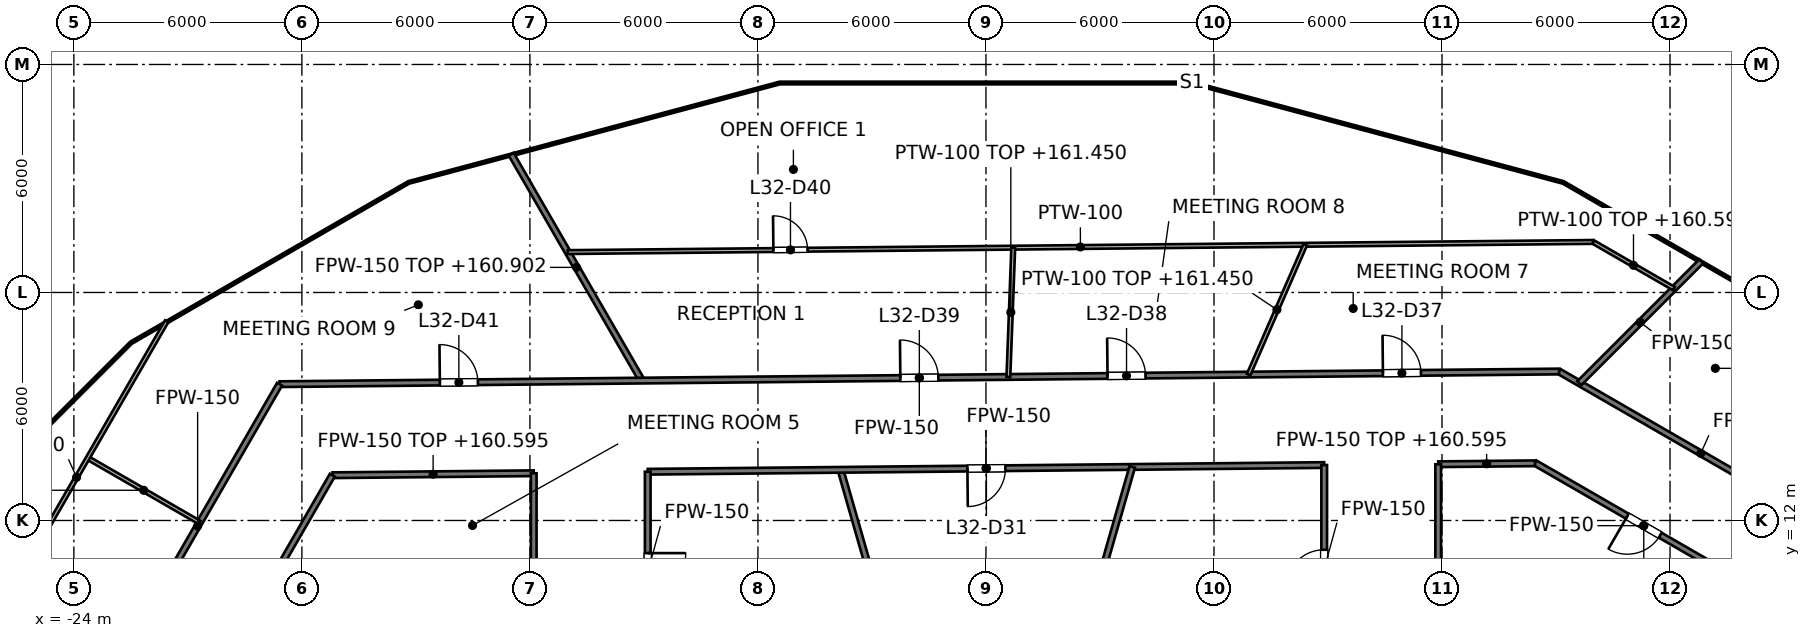
"""IFC4 building model, lengths in metres.
Left out: names, types, materials, properties, quantities, classifications, styles, units other than length and angle.
Written with IfcOpenShell. Run it as: python <this file> out.ifc"""

import sys

from ifc_helpers import new_model, si_unit, direction, frame, frame_2d, origin, place, context, subcontext, project, spatial, rectangle, extrude, element, fill, save


model = new_model("IFC4")
c1 = context("Model", 3, precision=1e-05, world=origin(), true_north=direction((0.0, 1.0)))
c2 = subcontext(c1, "Body", "Model", "MODEL_VIEW")
j1 = project(units=[si_unit("LENGTHUNIT", "METRE"), si_unit("PLANEANGLEUNIT", "RADIAN")], contexts=[c1])
p1 = place(None, origin())
s1 = spatial("IfcSite", under=j1, at=p1, CompositionType="ELEMENT")
p2 = place(p1, origin())
s2 = spatial("IfcBuilding", under=s1, at=p2, CompositionType="ELEMENT")
p3 = place(p2, frame((0.0, 0.0, 157.6)))
s3 = spatial("IfcBuildingStorey", under=s2, at=p3, CompositionType="ELEMENT", Elevation=157.6)
p4 = place(p3, frame((-3.827, 13.333, 0.0), z_axis=(0.0, 0.0, 1.0), x_axis=(0.275935525478, -0.961176147113, 0.0)))
e1 = element("IfcWall", 1, at=p4, inside=s3, PredefinedType="PARTITIONING", context=c2, shape_type="SweptSolid", body=[
    extrude(rectangle(XDim=5.548, YDim=0.15, at=frame_2d((2.774, 0.0))), origin(), (0.0, 0.0, 1.0), 3.85),
])
p5 = place(p3, frame((-12.493, 21.639, 0.0), z_axis=(0.0, 0.0, 1.0), x_axis=(0.499964153563, -0.866046098746, 0.0)))
e2 = element("IfcWall", 2, at=p5, inside=s3, PredefinedType="PARTITIONING", context=c2, shape_type="SweptSolid", body=[
    extrude(rectangle(XDim=6.878, YDim=0.15, at=frame_2d((3.439, 0.0))), origin(), (0.0, 0.0, 1.0), 3.302),
])
p6 = place(p3, frame((14.448, 13.515, 0.0), z_axis=(0.0, 0.0, 1.0), x_axis=(0.865975016585, -0.500087263036, 0.0)))
e3 = element("IfcWall", 3, at=p6, inside=s3, PredefinedType="PARTITIONING", context=c2, shape_type="SweptSolid", body=[
    extrude(rectangle(XDim=6.604, YDim=0.15, at=frame_2d((3.302, 0.0))), origin(), (0.0, 0.0, 1.0), 2.927),
])
p7 = place(p6, frame((2.804, 0.0, 0.0)))
e4 = element("IfcOpeningElement", 4, at=p7, cuts=e3, PredefinedType="OPENING", context=c2, shape_type="SweptSolid", body=[
    extrude(rectangle(XDim=1.0, YDim=2.1, at=frame_2d((0.5, 1.05))), frame((0.0, 0.075, 0.0), z_axis=(0.0, -1.0, 0.0), x_axis=(1.0, 0.0, 0.0)), (0.0, 0.0, 1.0), 0.15),
])
p8 = place(p3, frame((15.08, 15.921, 0.0), z_axis=(0.0, 0.0, 1.0), x_axis=(0.865982112089, -0.50007497592, 0.0)))
e5 = element("IfcWall", 5, at=p8, inside=s3, PredefinedType="PARTITIONING", context=c2, shape_type="SweptSolid", body=[
    extrude(rectangle(XDim=8.613, YDim=0.15, at=frame_2d((4.306, 0.0))), origin(), (0.0, 0.0, 1.0), 2.927),
])
p9 = place(p3, frame((-17.194, 13.191, 0.0), z_axis=(0.0, 0.0, 1.0), x_axis=(0.999950853109, 0.009914200296, 0.0)))
e6 = element("IfcWall", 6, at=p9, inside=s3, PredefinedType="PARTITIONING", context=c2, shape_type="SweptSolid", body=[
    extrude(rectangle(XDim=5.294, YDim=0.15, at=frame_2d((2.647, 0.0))), origin(), (0.0, 0.0, 1.0), 2.995),
])
p10 = place(p3, frame((-8.9, 13.282, 0.0), z_axis=(0.0, 0.0, 1.0), x_axis=(0.999950834077, 0.009916119672, 0.0)))
e7 = element("IfcWall", 7, at=p10, inside=s3, PredefinedType="PARTITIONING", context=c2, shape_type="SweptSolid", body=[
    extrude(rectangle(XDim=17.801, YDim=0.15, at=frame_2d((8.9, 0.0))), origin(), (0.0, 0.0, 1.0), 2.927),
])
p11 = place(p10, frame((8.412, 0.0, 0.0)))
e8 = element("IfcOpeningElement", 8, at=p11, cuts=e7, PredefinedType="OPENING", context=c2, shape_type="SweptSolid", body=[
    extrude(rectangle(XDim=1.0, YDim=2.1, at=frame_2d((0.5, 1.05))), frame((0.0, 0.075, 0.0), z_axis=(0.0, -1.0, 0.0), x_axis=(1.0, 0.0, 0.0)), (0.0, 0.0, 1.0), 0.15),
])
p12 = place(p3, frame((11.9, 13.48, 0.0), z_axis=(0.0, 0.0, 1.0), x_axis=(0.999950357576, 0.009964054536, 0.0)))
e9 = element("IfcWall", 9, at=p12, inside=s3, PredefinedType="PARTITIONING", context=c2, shape_type="SweptSolid", body=[
    extrude(rectangle(XDim=2.548, YDim=0.15, at=frame_2d((1.274, 0.0))), origin(), (0.0, 0.0, 1.0), 2.995),
])
p13 = place(p3, frame((-18.587, 15.587, 0.0), z_axis=(0.0, 0.0, 1.0), x_axis=(0.99995087003, 0.009912493396, 0.0)))
e10 = element("IfcWall", 10, at=p13, inside=s3, PredefinedType="PARTITIONING", context=c2, shape_type="SweptSolid", body=[
    extrude(rectangle(XDim=33.669, YDim=0.15, at=frame_2d((16.834, 0.0))), origin(), (0.0, 0.0, 1.0), 2.927),
])
p14 = place(p13, frame((29.033, 0.0, 0.0)))
e11 = element("IfcOpeningElement", 11, at=p14, cuts=e10, PredefinedType="OPENING", context=c2, shape_type="SweptSolid", body=[
    extrude(rectangle(XDim=1.0, YDim=2.1, at=frame_2d((0.5, 1.05))), frame((0.0, 0.075, 0.0), z_axis=(0.0, -1.0, 0.0), x_axis=(1.0, 0.0, 0.0)), (0.0, 0.0, 1.0), 0.15),
])
p15 = place(p13, frame((21.787, 0.0, 0.0)))
e12 = element("IfcOpeningElement", 12, at=p15, cuts=e10, PredefinedType="OPENING", context=c2, shape_type="SweptSolid", body=[
    extrude(rectangle(XDim=1.0, YDim=2.1, at=frame_2d((0.5, 1.05))), frame((0.0, 0.075, 0.0), z_axis=(0.0, -1.0, 0.0), x_axis=(1.0, 0.0, 0.0)), (0.0, 0.0, 1.0), 0.15),
])
p16 = place(p13, frame((16.335, 0.0, 0.0)))
e13 = element("IfcOpeningElement", 13, at=p16, cuts=e10, PredefinedType="OPENING", context=c2, shape_type="SweptSolid", body=[
    extrude(rectangle(XDim=1.0, YDim=2.1, at=frame_2d((0.5, 1.05))), frame((0.0, 0.075, 0.0), z_axis=(0.0, -1.0, 0.0), x_axis=(1.0, 0.0, 0.0)), (0.0, 0.0, 1.0), 0.15),
])
p17 = place(p13, frame((4.217, 0.0, 0.0)))
e14 = element("IfcOpeningElement", 14, at=p17, cuts=e10, PredefinedType="OPENING", context=c2, shape_type="SweptSolid", body=[
    extrude(rectangle(XDim=1.0, YDim=2.1, at=frame_2d((0.5, 1.05))), frame((0.0, 0.075, 0.0), z_axis=(0.0, -1.0, 0.0), x_axis=(1.0, 0.0, 0.0)), (0.0, 0.0, 1.0), 0.15),
])
p18 = place(p3, frame((15.613, 15.613, 0.0), z_axis=(0.0, 0.0, 1.0), x_axis=(0.707106781187, 0.707106781187, 0.0)))
e15 = element("IfcWall", 15, at=p18, inside=s3, PredefinedType="PARTITIONING", context=c2, shape_type="SweptSolid", body=[
    extrude(rectangle(XDim=4.538, YDim=0.15, at=frame_2d((2.269, 0.0))), origin(), (0.0, 0.0, 1.0), 2.995),
])
p19 = place(p3, frame((-20.5, 7.474, 0.0), z_axis=(0.0, 0.0, 1.0), x_axis=(0.500012665616, 0.866018091164, 0.0)))
e16 = element("IfcWall", 16, at=p19, inside=s3, PredefinedType="PARTITIONING", context=c2, shape_type="SweptSolid", body=[
    extrude(rectangle(XDim=6.602, YDim=0.15, at=frame_2d((3.301, 0.0))), origin(), (0.0, 0.0, 1.0), 2.927),
])
p20 = place(p19, frame((2.803, 0.0, 0.0)))
e17 = element("IfcOpeningElement", 17, at=p20, cuts=e16, PredefinedType="OPENING", context=c2, shape_type="SweptSolid", body=[
    extrude(rectangle(XDim=1.0, YDim=2.1, at=frame_2d((0.5, 1.05))), frame((0.0, 0.075, 0.0), z_axis=(0.0, -1.0, 0.0), x_axis=(1.0, 0.0, 0.0)), (0.0, 0.0, 1.0), 0.15),
])
p21 = place(p3, frame((-22.9, 8.117, 0.0), z_axis=(0.0, 0.0, 1.0), x_axis=(0.5000050195, 0.866022505755, 0.0)))
e18 = element("IfcWall", 18, at=p21, inside=s3, PredefinedType="PARTITIONING", context=c2, shape_type="SweptSolid", body=[
    extrude(rectangle(XDim=8.626, YDim=0.15, at=frame_2d((4.313, 0.0))), origin(), (0.0, 0.0, 1.0), 2.927),
])
p22 = place(p3, frame((2.296, 8.0, 0.0), z_axis=(0.0, 0.0, 1.0), x_axis=(0.275958345059, 0.961169595749, 0.0)))
e19 = element("IfcWall", 19, at=p22, inside=s3, PredefinedType="PARTITIONING", context=c2, shape_type="SweptSolid", body=[
    extrude(rectangle(XDim=5.628, YDim=0.15, at=frame_2d((2.814, 0.0))), origin(), (0.0, 0.0, 1.0), 3.85),
])
p23 = place(p3, frame((11.9, 8.0, 0.0), z_axis=(0.0, 0.0, 1.0), x_axis=(0.0, 1.0, 0.0)))
e20 = element("IfcWall", 20, at=p23, inside=s3, PredefinedType="PARTITIONING", context=c2, shape_type="SweptSolid", body=[
    extrude(rectangle(XDim=5.479, YDim=0.15, at=frame_2d((2.74, 0.0))), origin(), (0.0, 0.0, 1.0), 2.927),
])
p24 = place(p3, frame((8.9, 8.0, 0.0), z_axis=(0.0, 0.0, 1.0), x_axis=(0.0, 1.0, 0.0)))
e21 = element("IfcWall", 21, at=p24, inside=s3, PredefinedType="PARTITIONING", context=c2, shape_type="SweptSolid", body=[
    extrude(rectangle(XDim=5.46, YDim=0.15, at=frame_2d((2.73, 0.0))), origin(), (0.0, 0.0, 1.0), 2.927),
])
p25 = place(p24, frame((2.23, 0.0, 0.0)))
e22 = element("IfcOpeningElement", 22, at=p25, cuts=e21, PredefinedType="OPENING", context=c2, shape_type="SweptSolid", body=[
    extrude(rectangle(XDim=1.0, YDim=2.1, at=frame_2d((0.5, 1.05))), frame((0.0, 0.075, 0.0), z_axis=(0.0, -1.0, 0.0), x_axis=(1.0, 0.0, 0.0)), (0.0, 0.0, 1.0), 0.15),
])
p26 = place(p3, frame((-8.9, 8.0, 0.0), z_axis=(0.0, 0.0, 1.0), x_axis=(0.0, 1.0, 0.0)))
e23 = element("IfcWall", 23, at=p26, inside=s3, PredefinedType="PARTITIONING", context=c2, shape_type="SweptSolid", body=[
    extrude(rectangle(XDim=5.283, YDim=0.15, at=frame_2d((2.642, 0.0))), origin(), (0.0, 0.0, 1.0), 2.927),
])
p27 = place(p26, frame((2.142, 0.0, 0.0)))
e24 = element("IfcOpeningElement", 24, at=p27, cuts=e23, PredefinedType="OPENING", context=c2, shape_type="SweptSolid", body=[
    extrude(rectangle(XDim=1.0, YDim=2.1, at=frame_2d((0.5, 1.05))), frame((0.0, 0.075, 0.0), z_axis=(0.0, -1.0, 0.0), x_axis=(1.0, 0.0, 0.0)), (0.0, 0.0, 1.0), 0.15),
])
p28 = place(p3, frame((-11.9, 8.0, 0.0), z_axis=(0.0, 0.0, 1.0), x_axis=(0.0, 1.0, 0.0)))
e25 = element("IfcWall", 25, at=p28, inside=s3, PredefinedType="PARTITIONING", context=c2, shape_type="SweptSolid", body=[
    extrude(rectangle(XDim=5.243, YDim=0.15, at=frame_2d((2.622, 0.0))), origin(), (0.0, 0.0, 1.0), 2.927),
])
p29 = place(p3, frame((-23.634, 13.645, 0.0), z_axis=(0.0, 0.0, 1.0), x_axis=(0.866002606077, -0.500039484709, 0.0)))
e26 = element("IfcWall", 26, at=p29, inside=s3, PredefinedType="PARTITIONING", context=c2, shape_type="SweptSolid", body=[
    extrude(rectangle(XDim=3.4, YDim=0.1, at=frame_2d((1.7, 0.0))), origin(), (0.0, 0.0, 1.0), 3.152),
])
p30 = place(p3, frame((15.975, 19.33, 0.0), z_axis=(0.0, 0.0, 1.0), x_axis=(0.865977001312, -0.500083826171, 0.0)))
e27 = element("IfcWall", 27, at=p30, inside=s3, PredefinedType="PARTITIONING", context=c2, shape_type="SweptSolid", body=[
    extrude(rectangle(XDim=2.456, YDim=0.1, at=frame_2d((1.228, 0.0))), origin(), (0.0, 0.0, 1.0), 2.995),
])
p31 = place(p3, frame((-11.006, 19.063, 0.0), z_axis=(0.0, 0.0, 1.0), x_axis=(0.999951007424, 0.009898623735, 0.0)))
e28 = element("IfcWall", 28, at=p31, inside=s3, PredefinedType="PARTITIONING", context=c2, shape_type="SweptSolid", body=[
    extrude(rectangle(XDim=26.982, YDim=0.1, at=frame_2d((13.491, 0.0))), origin(), (0.0, 0.0, 1.0), 2.927),
])
p32 = place(p31, frame((5.412, 0.0, 0.0)))
e29 = element("IfcOpeningElement", 29, at=p32, cuts=e28, PredefinedType="OPENING", context=c2, shape_type="SweptSolid", body=[
    extrude(rectangle(XDim=0.9, YDim=2.1, at=frame_2d((0.45, 1.05))), frame((0.0, 0.05, 0.0), z_axis=(0.0, -1.0, 0.0), x_axis=(1.0, 0.0, 0.0)), (0.0, 0.0, 1.0), 0.1),
])
p33 = place(p3, frame((-26.3, 9.028, 0.0), z_axis=(0.0, 0.0, 1.0), x_axis=(0.499994996542, 0.866028292513, 0.0)))
e30 = element("IfcWall", 30, at=p33, inside=s3, PredefinedType="PARTITIONING", context=c2, shape_type="SweptSolid", body=[
    extrude(rectangle(XDim=9.486, YDim=0.1, at=frame_2d((4.743, 0.0))), origin(), (0.0, 0.0, 1.0), 2.927),
])
p34 = place(p3, frame((6.911, 15.84, 0.0), z_axis=(0.0, 0.0, 1.0), x_axis=(0.39992143624, 0.916549423019, 0.0)))
e31 = element("IfcWall", 31, at=p34, inside=s3, PredefinedType="PARTITIONING", context=c2, shape_type="SweptSolid", body=[
    extrude(rectangle(XDim=3.726, YDim=0.1, at=frame_2d((1.863, 0.0))), origin(), (0.0, 0.0, 1.0), 3.85),
])
p35 = place(p3, frame((0.59, 15.778, 0.0), z_axis=(0.0, 0.0, 1.0), x_axis=(0.037590068891, 0.999293243608, 0.0)))
e32 = element("IfcWall", 32, at=p35, inside=s3, PredefinedType="PARTITIONING", context=c2, shape_type="SweptSolid", body=[
    extrude(rectangle(XDim=3.403, YDim=0.1, at=frame_2d((1.702, 0.0))), origin(), (0.0, 0.0, 1.0), 3.85),
])
p36 = place(p7, origin())
e33 = element("IfcDoor", 33, at=p36, inside=s3, OperationType="SINGLE_SWING_LEFT", PredefinedType="DOOR", context=c2, shape_type="SweptSolid", body=[
    extrude(rectangle(XDim=1.0, YDim=2.1, at=frame_2d((0.5, 1.05))), frame((0.0, 0.025, 0.0), z_axis=(0.0, -1.0, 0.0), x_axis=(1.0, 0.0, 0.0)), (0.0, 0.0, 1.0), 0.05),
])
fill(e4, e33)
p37 = place(p25, origin())
e34 = element("IfcDoor", 34, at=p37, inside=s3, OperationType="SINGLE_SWING_LEFT", PredefinedType="DOOR", context=c2, shape_type="SweptSolid", body=[
    extrude(rectangle(XDim=1.0, YDim=2.1, at=frame_2d((0.5, 1.05))), frame((0.0, 0.025, 0.0), z_axis=(0.0, -1.0, 0.0), x_axis=(1.0, 0.0, 0.0)), (0.0, 0.0, 1.0), 0.05),
])
fill(e22, e34)
p38 = place(p11, origin())
e35 = element("IfcDoor", 35, at=p38, inside=s3, OperationType="SINGLE_SWING_LEFT", PredefinedType="DOOR", context=c2, shape_type="SweptSolid", body=[
    extrude(rectangle(XDim=1.0, YDim=2.1, at=frame_2d((0.5, 1.05))), frame((0.0, 0.025, 0.0), z_axis=(0.0, -1.0, 0.0), x_axis=(1.0, 0.0, 0.0)), (0.0, 0.0, 1.0), 0.05),
])
fill(e8, e35)
p39 = place(p27, origin())
e36 = element("IfcDoor", 36, at=p39, inside=s3, OperationType="SINGLE_SWING_RIGHT", PredefinedType="DOOR", context=c2, shape_type="SweptSolid", body=[
    extrude(rectangle(XDim=1.0, YDim=2.1, at=frame_2d((0.5, 1.05))), frame((0.0, 0.025, 0.0), z_axis=(0.0, -1.0, 0.0), x_axis=(1.0, 0.0, 0.0)), (0.0, 0.0, 1.0), 0.05),
])
fill(e24, e36)
p40 = place(p14, origin())
e37 = element("IfcDoor", 37, at=p40, inside=s3, OperationType="SINGLE_SWING_LEFT", PredefinedType="DOOR", context=c2, shape_type="SweptSolid", body=[
    extrude(rectangle(XDim=1.0, YDim=2.1, at=frame_2d((0.5, 1.05))), frame((0.0, 0.025, 0.0), z_axis=(0.0, -1.0, 0.0), x_axis=(1.0, 0.0, 0.0)), (0.0, 0.0, 1.0), 0.05),
])
fill(e11, e37)
p41 = place(p15, origin())
e38 = element("IfcDoor", 38, at=p41, inside=s3, OperationType="SINGLE_SWING_LEFT", PredefinedType="DOOR", context=c2, shape_type="SweptSolid", body=[
    extrude(rectangle(XDim=1.0, YDim=2.1, at=frame_2d((0.5, 1.05))), frame((0.0, 0.025, 0.0), z_axis=(0.0, -1.0, 0.0), x_axis=(1.0, 0.0, 0.0)), (0.0, 0.0, 1.0), 0.05),
])
fill(e12, e38)
p42 = place(p16, origin())
e39 = element("IfcDoor", 39, at=p42, inside=s3, OperationType="SINGLE_SWING_LEFT", PredefinedType="DOOR", context=c2, shape_type="SweptSolid", body=[
    extrude(rectangle(XDim=1.0, YDim=2.1, at=frame_2d((0.5, 1.05))), frame((0.0, 0.025, 0.0), z_axis=(0.0, -1.0, 0.0), x_axis=(1.0, 0.0, 0.0)), (0.0, 0.0, 1.0), 0.05),
])
fill(e13, e39)
p43 = place(p32, origin())
e40 = element("IfcDoor", 40, at=p43, inside=s3, OperationType="SINGLE_SWING_LEFT", PredefinedType="DOOR", context=c2, shape_type="SweptSolid", body=[
    extrude(rectangle(XDim=0.9, YDim=2.1, at=frame_2d((0.45, 1.05))), frame((0.0, 0.025, 0.0), z_axis=(0.0, -1.0, 0.0), x_axis=(1.0, 0.0, 0.0)), (0.0, 0.0, 1.0), 0.05),
])
fill(e29, e40)
p44 = place(p17, origin())
e41 = element("IfcDoor", 41, at=p44, inside=s3, OperationType="SINGLE_SWING_LEFT", PredefinedType="DOOR", context=c2, shape_type="SweptSolid", body=[
    extrude(rectangle(XDim=1.0, YDim=2.1, at=frame_2d((0.5, 1.05))), frame((0.0, 0.025, 0.0), z_axis=(0.0, -1.0, 0.0), x_axis=(1.0, 0.0, 0.0)), (0.0, 0.0, 1.0), 0.05),
])
fill(e14, e41)
save(model, sys.argv[1])
